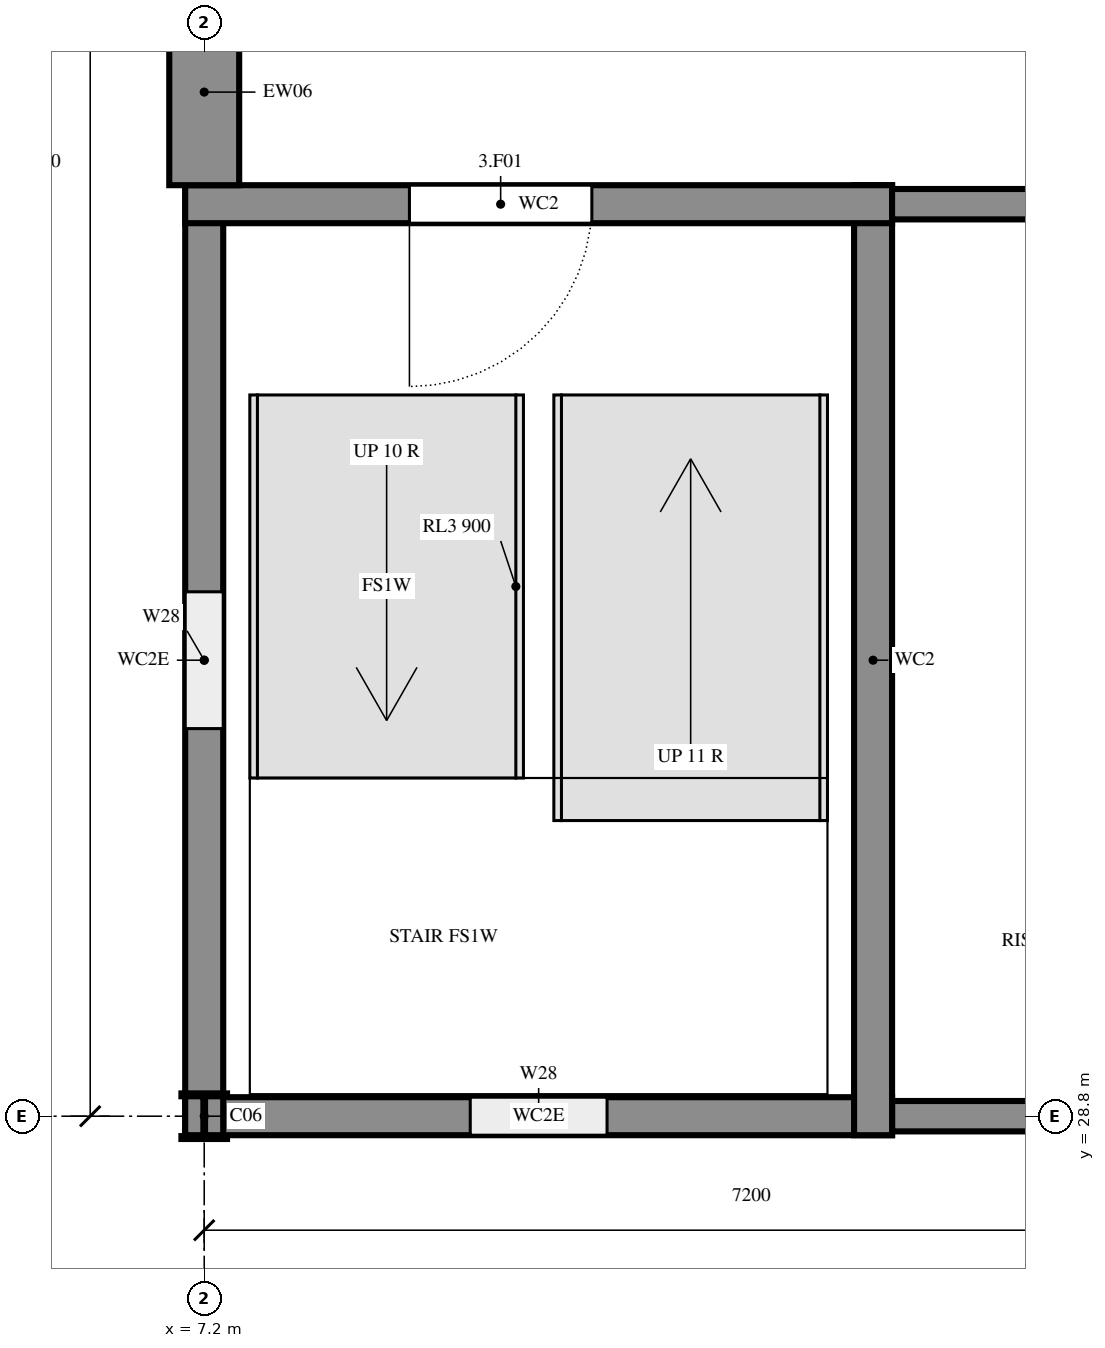
"""IFC4 building model, lengths in metres.
Left out: names, types, materials, properties, quantities, classifications, styles, units other than length and angle.
Written with IfcOpenShell. Run it as: python <this file> out.ifc"""

import sys

from ifc_helpers import new_model, si_unit, direction, frame, frame_2d, origin, origin_2d, place, context, subcontext, project, spatial, rectangle, i_section, extrude, element, fill, save


model = new_model("IFC4")
c1 = context("Model", 3, precision=1e-05, world=origin(), true_north=direction((0.0, 1.0)))
c2 = subcontext(c1, "Body", "Model", "MODEL_VIEW")
j1 = project(units=[si_unit("LENGTHUNIT", "METRE"), si_unit("PLANEANGLEUNIT", "RADIAN")], contexts=[c1])
p1 = place(None, origin())
s1 = spatial("IfcSite", under=j1, at=p1, CompositionType="ELEMENT")
p2 = place(p1, origin())
s2 = spatial("IfcBuilding", under=s1, at=p2, CompositionType="ELEMENT")
p3 = place(p2, frame((0.0, 0.0, 10.8)))
s3 = spatial("IfcBuildingStorey", under=s2, at=p3, CompositionType="ELEMENT", Elevation=10.8)
p4 = place(p3, frame((7.2, 28.8, 0.0), z_axis=(0.0, 0.0, 1.0), x_axis=(1.0, 0.0, 0.0)))
e1 = element("IfcColumn", 1, at=p4, inside=s3, PredefinedType="COLUMN", context=c2, shape_type="SweptSolid", body=[
    extrude(i_section(OverallWidth=0.3, OverallDepth=0.3, WebThickness=0.011, FlangeThickness=0.019, FilletRadius=0.027, at=origin_2d()), origin(), (0.0, 0.0, 1.0), 3.6),
])
p5 = place(p3, frame((7.075, 28.8, 0.0), z_axis=(0.0, 0.0, 1.0), x_axis=(1.0, 0.0, 0.0)))
e2 = element("IfcWall", 2, at=p5, inside=s3, PredefinedType="SHEAR", context=c2, shape_type="SweptSolid", body=[
    extrude(rectangle(XDim=4.65, YDim=0.25, at=frame_2d((2.325, 0.0))), origin(), (0.0, 0.0, 1.0), 3.6),
])
p6 = place(p5, frame((1.875, 0.0, 0.6)))
e3 = element("IfcOpeningElement", 3, at=p6, cuts=e2, PredefinedType="OPENING", context=c2, shape_type="SweptSolid", body=[
    extrude(rectangle(XDim=0.9, YDim=2.1, at=frame_2d((0.45, 1.05))), frame((0.0, 0.135, 0.0), z_axis=(0.0, -1.0, 0.0), x_axis=(1.0, 0.0, 0.0)), (0.0, 0.0, 1.0), 0.27),
])
p7 = place(p3, frame((11.725, 28.8, 0.0), z_axis=(0.0, 0.0, 1.0), x_axis=(1.0, 0.0, 0.0)))
e4 = element("IfcWall", 4, at=p7, inside=s3, PredefinedType="SHEAR", context=c2, shape_type="SweptSolid", body=[
    extrude(rectangle(XDim=2.775, YDim=0.2, at=frame_2d((1.387, 0.0))), origin(), (0.0, 0.0, 1.0), 3.6),
])
p8 = place(p3, frame((11.6, 28.675, 0.0), z_axis=(0.0, 0.0, 1.0), x_axis=(0.0, 1.0, 0.0)))
e5 = element("IfcWall", 5, at=p8, inside=s3, PredefinedType="SHEAR", context=c2, shape_type="SweptSolid", body=[
    extrude(rectangle(XDim=6.25, YDim=0.25, at=frame_2d((3.125, 0.0))), origin(), (0.0, 0.0, 1.0), 3.6),
])
p9 = place(p3, frame((7.2, 34.925, 0.0), z_axis=(0.0, 0.0, 1.0), x_axis=(0.0, -1.0, 0.0)))
e6 = element("IfcWall", 6, at=p9, inside=s3, PredefinedType="SHEAR", context=c2, shape_type="SweptSolid", body=[
    extrude(rectangle(XDim=6.25, YDim=0.25, at=frame_2d((3.125, 0.0))), origin(), (0.0, 0.0, 1.0), 3.6),
])
p10 = place(p9, frame((2.675, 0.0, 0.6)))
e7 = element("IfcOpeningElement", 7, at=p10, cuts=e6, PredefinedType="OPENING", context=c2, shape_type="SweptSolid", body=[
    extrude(rectangle(XDim=0.9, YDim=2.1, at=frame_2d((0.45, 1.05))), frame((0.0, 0.135, 0.0), z_axis=(0.0, -1.0, 0.0), x_axis=(1.0, 0.0, 0.0)), (0.0, 0.0, 1.0), 0.27),
])
p11 = place(p3, frame((11.725, 34.8, 0.0), z_axis=(0.0, 0.0, 1.0), x_axis=(-1.0, 0.0, 0.0)))
e8 = element("IfcWall", 8, at=p11, inside=s3, PredefinedType="SHEAR", context=c2, shape_type="SweptSolid", body=[
    extrude(rectangle(XDim=4.65, YDim=0.25, at=frame_2d((2.325, 0.0))), origin(), (0.0, 0.0, 1.0), 3.6),
])
p12 = place(p11, frame((1.975, 0.0, 0.0)))
e9 = element("IfcOpeningElement", 9, at=p12, cuts=e8, PredefinedType="OPENING", context=c2, shape_type="SweptSolid", body=[
    extrude(rectangle(XDim=1.2, YDim=2.4, at=frame_2d((0.6, 1.2))), frame((0.0, 0.135, 0.0), z_axis=(0.0, -1.0, 0.0), x_axis=(1.0, 0.0, 0.0)), (0.0, 0.0, 1.0), 0.27),
])
p13 = place(p3, frame((14.5, 34.8, 0.0), z_axis=(0.0, 0.0, 1.0), x_axis=(-1.0, 0.0, 0.0)))
e10 = element("IfcWall", 10, at=p13, inside=s3, PredefinedType="SHEAR", context=c2, shape_type="SweptSolid", body=[
    extrude(rectangle(XDim=2.775, YDim=0.2, at=frame_2d((1.387, 0.0))), origin(), (0.0, 0.0, 1.0), 3.6),
])
p14 = place(p3, frame((7.2, 36.15, 0.0), z_axis=(0.0, 0.0, 1.0), x_axis=(0.0, -1.0, 0.0)))
e11 = element("IfcWall", 11, at=p14, inside=s3, PredefinedType="SOLIDWALL", context=c2, shape_type="SweptSolid", body=[
    extrude(rectangle(XDim=1.225, YDim=0.46, at=frame_2d((0.612, 0.0))), origin(), (0.0, 0.0, 1.0), 3.22),
])
p15 = place(p6, origin())
e12 = element("IfcWindow", 12, at=p15, inside=s3, PartitioningType="SINGLE_PANEL", PredefinedType="WINDOW", context=c2, shape_type="SweptSolid", body=[
    extrude(rectangle(XDim=0.9, YDim=2.1, at=frame_2d((0.45, 1.05))), frame((0.0, 0.03, 0.0), z_axis=(0.0, -1.0, 0.0), x_axis=(1.0, 0.0, 0.0)), (0.0, 0.0, 1.0), 0.06),
])
fill(e3, e12)
p16 = place(p10, origin())
e13 = element("IfcWindow", 13, at=p16, inside=s3, PartitioningType="SINGLE_PANEL", PredefinedType="WINDOW", context=c2, shape_type="SweptSolid", body=[
    extrude(rectangle(XDim=0.9, YDim=2.1, at=frame_2d((0.45, 1.05))), frame((0.0, 0.03, 0.0), z_axis=(0.0, -1.0, 0.0), x_axis=(1.0, 0.0, 0.0)), (0.0, 0.0, 1.0), 0.06),
])
fill(e7, e13)
p17 = place(p12, origin())
e14 = element("IfcDoor", 14, at=p17, inside=s3, OperationType="SINGLE_SWING_LEFT", PredefinedType="DOOR", context=c2, shape_type="SweptSolid", body=[
    extrude(rectangle(XDim=1.2, YDim=2.4, at=frame_2d((0.6, 1.2))), frame((0.0, 0.025, 0.0), z_axis=(0.0, -1.0, 0.0), x_axis=(1.0, 0.0, 0.0)), (0.0, 0.0, 1.0), 0.05),
])
fill(e9, e14)
save(model, sys.argv[1])
